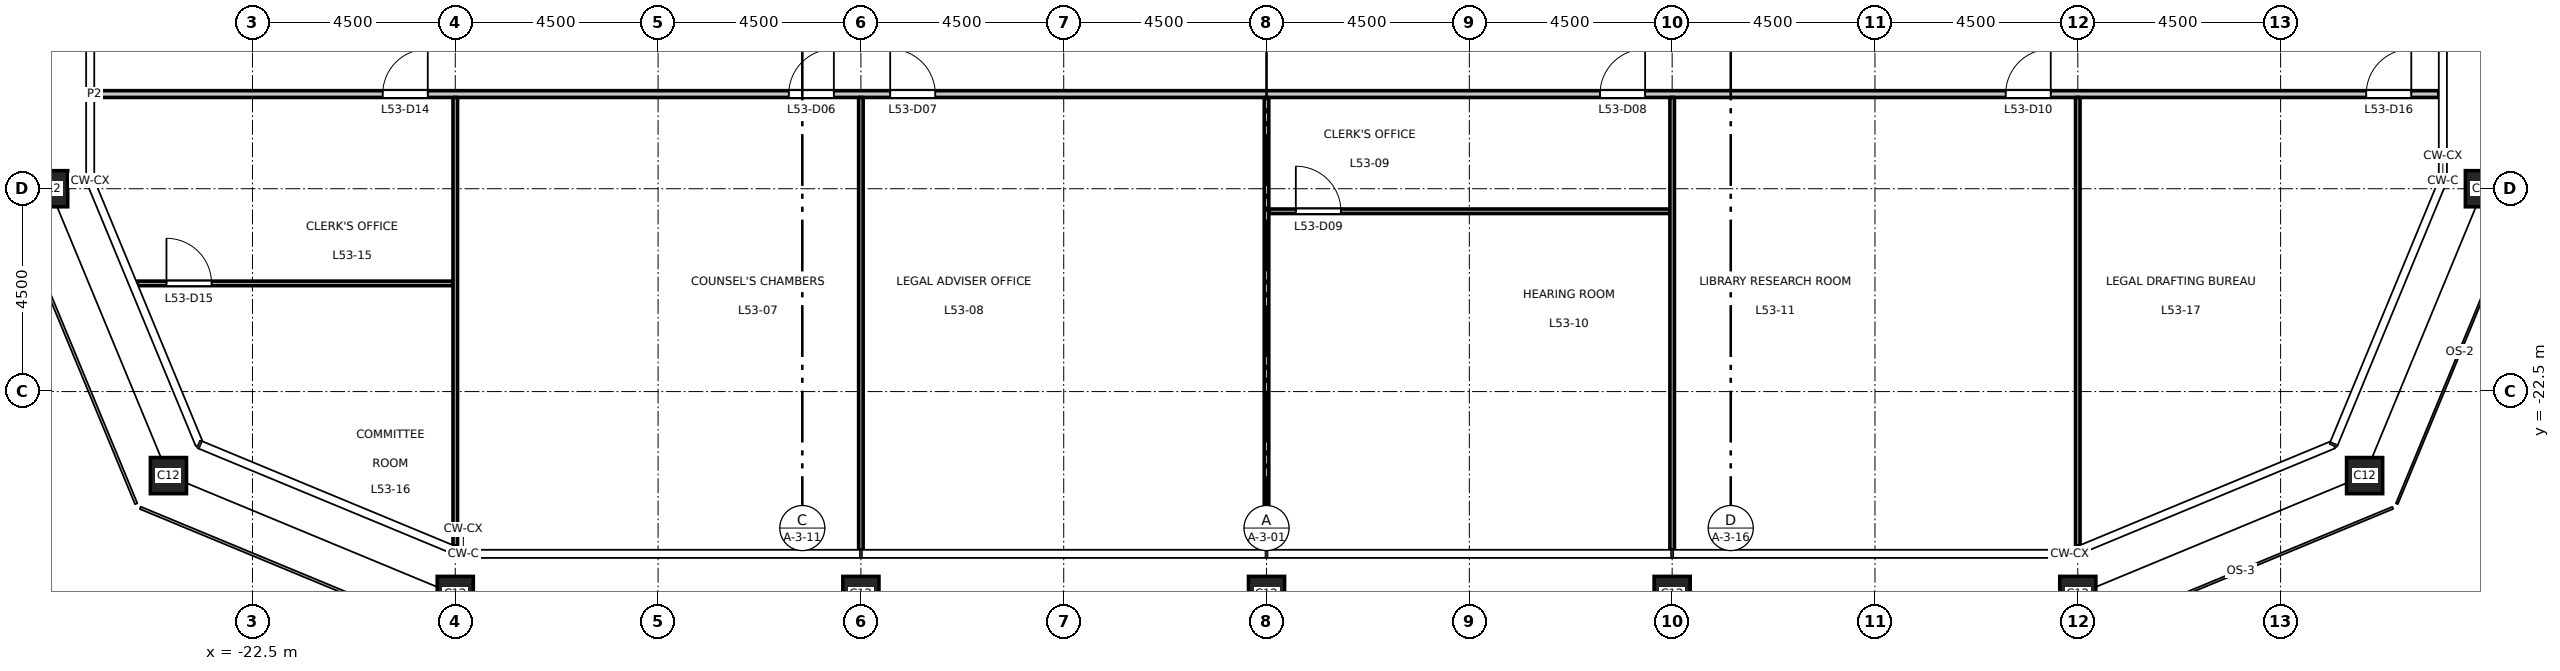
"""IFC4 building model, lengths in metres.
Left out: names, types, materials, properties, quantities, classifications, styles, units other than length and angle.
Written with IfcOpenShell. Run it as: python <this file> out.ifc"""

import sys

from ifc_helpers import new_model, si_unit, direction, frame, frame_2d, origin, origin_2d, place, context, subcontext, project, spatial, rectangle, hollow_rectangle, extrude, element, fill, save


model = new_model("IFC4")
c1 = context("Model", 3, precision=1e-05, world=origin(), true_north=direction((0.0, 1.0)))
c2 = subcontext(c1, "Body", "Model", "MODEL_VIEW")
j1 = project(units=[si_unit("LENGTHUNIT", "METRE"), si_unit("PLANEANGLEUNIT", "RADIAN")], contexts=[c1])
p1 = place(None, origin())
s1 = spatial("IfcSite", under=j1, at=p1, CompositionType="ELEMENT")
p2 = place(p1, origin())
s2 = spatial("IfcBuilding", under=s1, at=p2, CompositionType="ELEMENT")
p3 = place(p2, frame((0.0, 0.0, 246.7)))
s3 = spatial("IfcBuildingStorey", under=s2, at=p3, CompositionType="ELEMENT", Elevation=246.7)
for number, where, z_axis, x_axis in (
    (1, (-18.0, -27.0, 0.0), (0.0, 0.0, 1.0), (1.0, 0.0, 0.0)),
    (2, (-9.0, -27.0, 0.0), (0.0, 0.0, 1.0), (1.0, 0.0, 0.0)),
    (3, (0.0, -27.0, 0.0), (0.0, 0.0, 1.0), (1.0, 0.0, 0.0)),
    (4, (9.0, -27.0, 0.0), (0.0, 0.0, 1.0), (1.0, 0.0, 0.0)),
    (5, (18.0, -27.0, 0.0), (0.0, 0.0, 1.0), (1.0, 0.0, 0.0)),
    (6, (24.364, -24.364, 0.0), (0.0, 0.0, 1.0), (1.0, 0.0, 0.0)),
    (7, (27.0, -18.0, 0.0), (0.0, 0.0, 1.0), (1.0, 0.0, 0.0)),
    (8, (-27.0, -18.0, 0.0), (0.0, 0.0, 1.0), (1.0, 0.0, 0.0)),
    (9, (-24.364, -24.364, 0.0), (0.0, 0.0, 1.0), (1.0, 0.0, 0.0)),
):
    element("IfcColumn", number, at=place(p3, frame(where, z_axis=z_axis, x_axis=x_axis)), inside=s3, PredefinedType="COLUMN", context=c2, shape_type="SweptSolid", body=[
        extrude(hollow_rectangle(XDim=0.8, YDim=0.8, WallThickness=0.045, at=origin_2d()), origin(), (0.0, 0.0, 1.0), 4.5),
    ])
p4 = place(p3, frame((-25.058, -20.1, 0.0), z_axis=(0.0, 0.0, 1.0), x_axis=(1.0, 0.0, 0.0)))
e10 = element("IfcWall", 10, at=p4, inside=s3, PredefinedType="PARTITIONING", context=c2, shape_type="SweptSolid", body=[
    extrude(rectangle(XDim=7.008, YDim=0.1, at=frame_2d((3.504, 0.0))), origin(), (0.0, 0.0, 1.0), 4.35),
])
p5 = place(p4, frame((0.65, 0.0, 0.0)))
e11 = element("IfcOpeningElement", 11, at=p5, cuts=e10, PredefinedType="OPENING", context=c2, shape_type="SweptSolid", body=[
    extrude(rectangle(XDim=1.0, YDim=2.1, at=frame_2d((0.5, 1.05))), frame((0.0, 0.06, 0.0), z_axis=(0.0, -1.0, 0.0), x_axis=(1.0, 0.0, 0.0)), (0.0, 0.0, 1.0), 0.12),
])
p6 = place(p3, frame((0.05, -18.5, 0.0), z_axis=(0.0, 0.0, 1.0), x_axis=(1.0, 0.0, 0.0)))
e12 = element("IfcWall", 12, at=p6, inside=s3, PredefinedType="PARTITIONING", context=c2, shape_type="SweptSolid", body=[
    extrude(rectangle(XDim=8.9, YDim=0.1, at=frame_2d((4.45, 0.0))), origin(), (0.0, 0.0, 1.0), 4.35),
])
p7 = place(p6, frame((0.6, 0.0, 0.0)))
e13 = element("IfcOpeningElement", 13, at=p7, cuts=e12, PredefinedType="OPENING", context=c2, shape_type="SweptSolid", body=[
    extrude(rectangle(XDim=1.0, YDim=2.1, at=frame_2d((0.5, 1.05))), frame((0.0, 0.06, 0.0), z_axis=(0.0, -1.0, 0.0), x_axis=(1.0, 0.0, 0.0)), (0.0, 0.0, 1.0), 0.12),
])
p8 = place(p3, frame((-26.01, -15.9, 0.0), z_axis=(0.0, 0.0, 1.0), x_axis=(1.0, 0.0, 0.0)))
e14 = element("IfcWall", 14, at=p8, inside=s3, PredefinedType="PARTITIONING", context=c2, shape_type="SweptSolid", body=[
    extrude(rectangle(XDim=52.02, YDim=0.15, at=frame_2d((26.01, 0.0))), origin(), (0.0, 0.0, 1.0), 4.35),
])
p9 = place(p8, frame((15.41, 0.0, 0.0)))
e15 = element("IfcOpeningElement", 15, at=p9, cuts=e14, PredefinedType="OPENING", context=c2, shape_type="SweptSolid", body=[
    extrude(rectangle(XDim=1.0, YDim=2.1, at=frame_2d((0.5, 1.05))), frame((0.0, 0.085, 0.0), z_axis=(0.0, -1.0, 0.0), x_axis=(1.0, 0.0, 0.0)), (0.0, 0.0, 1.0), 0.17),
])
p10 = place(p8, frame((17.66, 0.0, 0.0)))
e16 = element("IfcOpeningElement", 16, at=p10, cuts=e14, PredefinedType="OPENING", context=c2, shape_type="SweptSolid", body=[
    extrude(rectangle(XDim=1.0, YDim=2.1, at=frame_2d((0.5, 1.05))), frame((0.0, 0.085, 0.0), z_axis=(0.0, -1.0, 0.0), x_axis=(1.0, 0.0, 0.0)), (0.0, 0.0, 1.0), 0.17),
])
p11 = place(p8, frame((33.41, 0.0, 0.0)))
e17 = element("IfcOpeningElement", 17, at=p11, cuts=e14, PredefinedType="OPENING", context=c2, shape_type="SweptSolid", body=[
    extrude(rectangle(XDim=1.0, YDim=2.1, at=frame_2d((0.5, 1.05))), frame((0.0, 0.085, 0.0), z_axis=(0.0, -1.0, 0.0), x_axis=(1.0, 0.0, 0.0)), (0.0, 0.0, 1.0), 0.17),
])
p12 = place(p8, frame((42.41, 0.0, 0.0)))
e18 = element("IfcOpeningElement", 18, at=p12, cuts=e14, PredefinedType="OPENING", context=c2, shape_type="SweptSolid", body=[
    extrude(rectangle(XDim=1.0, YDim=2.1, at=frame_2d((0.5, 1.05))), frame((0.0, 0.085, 0.0), z_axis=(0.0, -1.0, 0.0), x_axis=(1.0, 0.0, 0.0)), (0.0, 0.0, 1.0), 0.17),
])
p13 = place(p8, frame((6.4, 0.0, 0.0)))
e19 = element("IfcOpeningElement", 19, at=p13, cuts=e14, PredefinedType="OPENING", context=c2, shape_type="SweptSolid", body=[
    extrude(rectangle(XDim=1.0, YDim=2.1, at=frame_2d((0.5, 1.05))), frame((0.0, 0.085, 0.0), z_axis=(0.0, -1.0, 0.0), x_axis=(1.0, 0.0, 0.0)), (0.0, 0.0, 1.0), 0.17),
])
p14 = place(p8, frame((50.41, 0.0, 0.0)))
e20 = element("IfcOpeningElement", 20, at=p14, cuts=e14, PredefinedType="OPENING", context=c2, shape_type="SweptSolid", body=[
    extrude(rectangle(XDim=1.0, YDim=2.1, at=frame_2d((0.5, 1.05))), frame((0.0, 0.085, 0.0), z_axis=(0.0, -1.0, 0.0), x_axis=(1.0, 0.0, 0.0)), (0.0, 0.0, 1.0), 0.17),
])
p15 = place(p3, frame((-18.0, -25.928, 0.0), z_axis=(0.0, 0.0, 1.0), x_axis=(0.0, 1.0, 0.0)))
e21 = element("IfcWall", 21, at=p15, inside=s3, PredefinedType="PARTITIONING", context=c2, shape_type="SweptSolid", body=[
    extrude(rectangle(XDim=9.953, YDim=0.1, at=frame_2d((4.977, 0.0))), origin(), (0.0, 0.0, 1.0), 3.65),
])
p16 = place(p3, frame((-9.0, -26.01, 0.0), z_axis=(0.0, 0.0, 1.0), x_axis=(0.0, 1.0, 0.0)))
e22 = element("IfcWall", 22, at=p16, inside=s3, PredefinedType="PARTITIONING", context=c2, shape_type="SweptSolid", body=[
    extrude(rectangle(XDim=10.035, YDim=0.1, at=frame_2d((5.018, 0.0))), origin(), (0.0, 0.0, 1.0), 3.65),
])
p17 = place(p3, frame((0.0, -26.01, 0.0), z_axis=(0.0, 0.0, 1.0), x_axis=(0.0, 1.0, 0.0)))
e23 = element("IfcWall", 23, at=p17, inside=s3, PredefinedType="PARTITIONING", context=c2, shape_type="SweptSolid", body=[
    extrude(rectangle(XDim=10.035, YDim=0.1, at=frame_2d((5.018, 0.0))), origin(), (0.0, 0.0, 1.0), 3.55),
])
p18 = place(p3, frame((9.0, -26.01, 0.0), z_axis=(0.0, 0.0, 1.0), x_axis=(0.0, 1.0, 0.0)))
e24 = element("IfcWall", 24, at=p18, inside=s3, PredefinedType="PARTITIONING", context=c2, shape_type="SweptSolid", body=[
    extrude(rectangle(XDim=10.035, YDim=0.1, at=frame_2d((5.018, 0.0))), origin(), (0.0, 0.0, 1.0), 3.65),
])
p19 = place(p3, frame((18.0, -25.928, 0.0), z_axis=(0.0, 0.0, 1.0), x_axis=(0.0, 1.0, 0.0)))
e25 = element("IfcWall", 25, at=p19, inside=s3, PredefinedType="PARTITIONING", context=c2, shape_type="SweptSolid", body=[
    extrude(rectangle(XDim=9.953, YDim=0.1, at=frame_2d((4.977, 0.0))), origin(), (0.0, 0.0, 1.0), 3.65),
])
p20 = place(p9, origin())
e26 = element("IfcDoor", 26, at=p20, inside=s3, OperationType="SINGLE_SWING_RIGHT", PredefinedType="DOOR", context=c2, shape_type="SweptSolid", body=[
    extrude(rectangle(XDim=1.0, YDim=2.1, at=frame_2d((0.5, 1.05))), frame((0.0, 0.025, 0.0), z_axis=(0.0, -1.0, 0.0), x_axis=(1.0, 0.0, 0.0)), (0.0, 0.0, 1.0), 0.05),
])
fill(e15, e26)
p21 = place(p10, origin())
e27 = element("IfcDoor", 27, at=p21, inside=s3, OperationType="SINGLE_SWING_LEFT", PredefinedType="DOOR", context=c2, shape_type="SweptSolid", body=[
    extrude(rectangle(XDim=1.0, YDim=2.1, at=frame_2d((0.5, 1.05))), frame((0.0, 0.025, 0.0), z_axis=(0.0, -1.0, 0.0), x_axis=(1.0, 0.0, 0.0)), (0.0, 0.0, 1.0), 0.05),
])
fill(e16, e27)
p22 = place(p11, origin())
e28 = element("IfcDoor", 28, at=p22, inside=s3, OperationType="SINGLE_SWING_RIGHT", PredefinedType="DOOR", context=c2, shape_type="SweptSolid", body=[
    extrude(rectangle(XDim=1.0, YDim=2.1, at=frame_2d((0.5, 1.05))), frame((0.0, 0.025, 0.0), z_axis=(0.0, -1.0, 0.0), x_axis=(1.0, 0.0, 0.0)), (0.0, 0.0, 1.0), 0.05),
])
fill(e17, e28)
p23 = place(p7, origin())
e29 = element("IfcDoor", 29, at=p23, inside=s3, OperationType="SINGLE_SWING_LEFT", PredefinedType="DOOR", context=c2, shape_type="SweptSolid", body=[
    extrude(rectangle(XDim=1.0, YDim=2.1, at=frame_2d((0.5, 1.05))), frame((0.0, 0.025, 0.0), z_axis=(0.0, -1.0, 0.0), x_axis=(1.0, 0.0, 0.0)), (0.0, 0.0, 1.0), 0.05),
])
fill(e13, e29)
p24 = place(p12, origin())
e30 = element("IfcDoor", 30, at=p24, inside=s3, OperationType="SINGLE_SWING_RIGHT", PredefinedType="DOOR", context=c2, shape_type="SweptSolid", body=[
    extrude(rectangle(XDim=1.0, YDim=2.1, at=frame_2d((0.5, 1.05))), frame((0.0, 0.025, 0.0), z_axis=(0.0, -1.0, 0.0), x_axis=(1.0, 0.0, 0.0)), (0.0, 0.0, 1.0), 0.05),
])
fill(e18, e30)
p25 = place(p13, origin())
e31 = element("IfcDoor", 31, at=p25, inside=s3, OperationType="SINGLE_SWING_RIGHT", PredefinedType="DOOR", context=c2, shape_type="SweptSolid", body=[
    extrude(rectangle(XDim=1.0, YDim=2.1, at=frame_2d((0.5, 1.05))), frame((0.0, 0.025, 0.0), z_axis=(0.0, -1.0, 0.0), x_axis=(1.0, 0.0, 0.0)), (0.0, 0.0, 1.0), 0.05),
])
fill(e19, e31)
p26 = place(p5, origin())
e32 = element("IfcDoor", 32, at=p26, inside=s3, OperationType="SINGLE_SWING_LEFT", PredefinedType="DOOR", context=c2, shape_type="SweptSolid", body=[
    extrude(rectangle(XDim=1.0, YDim=2.1, at=frame_2d((0.5, 1.05))), frame((0.0, 0.025, 0.0), z_axis=(0.0, -1.0, 0.0), x_axis=(1.0, 0.0, 0.0)), (0.0, 0.0, 1.0), 0.05),
])
fill(e11, e32)
p27 = place(p14, origin())
e33 = element("IfcDoor", 33, at=p27, inside=s3, OperationType="SINGLE_SWING_RIGHT", PredefinedType="DOOR", context=c2, shape_type="SweptSolid", body=[
    extrude(rectangle(XDim=1.0, YDim=2.1, at=frame_2d((0.5, 1.05))), frame((0.0, 0.025, 0.0), z_axis=(0.0, -1.0, 0.0), x_axis=(1.0, 0.0, 0.0)), (0.0, 0.0, 1.0), 0.05),
])
fill(e20, e33)
save(model, sys.argv[1])
